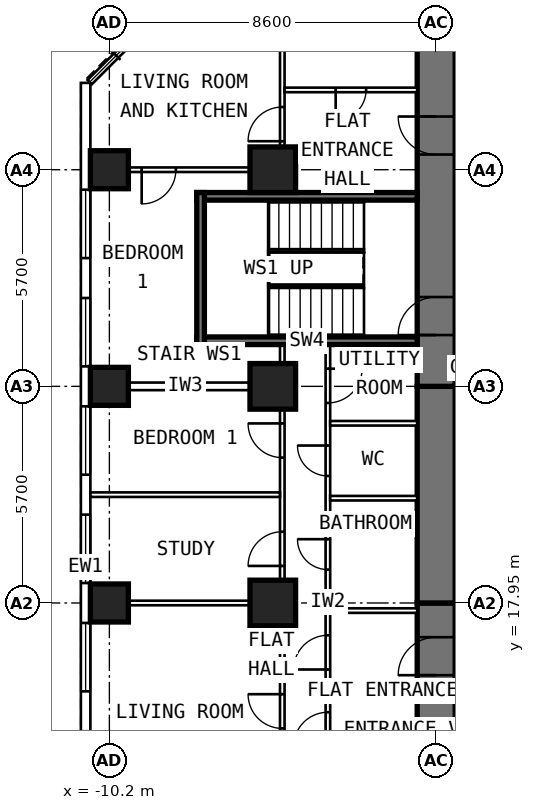
"""IFC4 building model, lengths in metres.
Left out: names, types, materials, properties, quantities, classifications, styles, units other than length and angle.
Written with IfcOpenShell. Run it as: python <this file> out.ifc"""

import sys

from ifc_helpers import new_model, si_unit, direction, frame, frame_2d, origin, origin_2d, place, context, subcontext, project, spatial, rectangle, extrude, element, fill, save


model = new_model("IFC4")
c1 = context("Model", 3, precision=1e-05, world=origin(), true_north=direction((0.0, 1.0)))
c2 = subcontext(c1, "Body", "Model", "MODEL_VIEW")
j1 = project(units=[si_unit("LENGTHUNIT", "METRE"), si_unit("PLANEANGLEUNIT", "RADIAN")], contexts=[c1])
p1 = place(None, origin())
s1 = spatial("IfcSite", under=j1, at=p1, CompositionType="ELEMENT")
p2 = place(p1, origin())
s2 = spatial("IfcBuilding", under=s1, at=p2, CompositionType="ELEMENT")
p3 = place(p2, frame((0.0, 0.0, 61.0)))
s3 = spatial("IfcBuildingStorey", under=s2, at=p3, CompositionType="ELEMENT", Elevation=61.0)
for number, where, z_axis, x_axis in (
    (1, (-10.2, 17.95, 0.0), (0.0, 0.0, 1.0), (0.0, 1.0, 0.0)),
    (2, (-10.2, 23.65, 0.0), (0.0, 0.0, 1.0), (0.0, 1.0, 0.0)),
    (3, (-10.2, 29.35, 0.0), (0.0, 0.0, 1.0), (0.0, 1.0, 0.0)),
):
    element("IfcColumn", number, at=place(p3, frame(where, z_axis=z_axis, x_axis=x_axis)), inside=s3, PredefinedType="COLUMN", context=c2, shape_type="SweptSolid", body=[
        extrude(rectangle(XDim=1.0, YDim=1.0, at=origin_2d()), origin(), (0.0, 0.0, 1.0), 3.6),
    ])
for number, where, z_axis, x_axis in (
    (4, (-5.9, 17.95, 0.0), (0.0, 0.0, 1.0), (0.0, 1.0, 0.0)),
    (5, (-5.9, 23.65, 0.0), (0.0, 0.0, 1.0), (0.0, 1.0, 0.0)),
    (6, (-5.9, 29.35, 0.0), (0.0, 0.0, 1.0), (0.0, 1.0, 0.0)),
):
    element("IfcColumn", number, at=place(p3, frame(where, z_axis=z_axis, x_axis=x_axis)), inside=s3, PredefinedType="COLUMN", context=c2, shape_type="SweptSolid", body=[
        extrude(rectangle(XDim=1.2, YDim=1.2, at=origin_2d()), origin(), (0.0, 0.0, 1.0), 3.6),
    ])
p4 = place(p3, frame((-1.6, 9.6, 0.0), z_axis=(0.0, 0.0, 1.0), x_axis=(0.0, 1.0, 0.0)))
e7 = element("IfcWall", 7, at=p4, inside=s3, PredefinedType="SHEAR", context=c2, shape_type="SweptSolid", body=[
    extrude(rectangle(XDim=8.35, YDim=1.0, at=frame_2d((4.175, 0.0))), origin(), (0.0, 0.0, 1.0), 3.6),
])
p5 = place(p4, frame((6.45, 0.0, 0.0)))
e8 = element("IfcOpeningElement", 8, at=p5, cuts=e7, PredefinedType="OPENING", context=c2, shape_type="SweptSolid", body=[
    extrude(rectangle(XDim=1.0, YDim=2.1, at=frame_2d((0.5, 1.05))), frame((0.0, 0.512, 0.0), z_axis=(0.0, -1.0, 0.0), x_axis=(1.0, 0.0, 0.0)), (0.0, 0.0, 1.0), 1.024),
])
p6 = place(p3, frame((-1.6, 17.95, 0.0), z_axis=(0.0, 0.0, 1.0), x_axis=(0.0, 1.0, 0.0)))
e9 = element("IfcWall", 9, at=p6, inside=s3, PredefinedType="SHEAR", context=c2, shape_type="SweptSolid", body=[
    extrude(rectangle(XDim=5.7, YDim=1.0, at=frame_2d((2.85, 0.0))), origin(), (0.0, 0.0, 1.0), 3.6),
])
p7 = place(p3, frame((-1.6, 23.65, 0.0), z_axis=(0.0, 0.0, 1.0), x_axis=(0.0, 1.0, 0.0)))
e10 = element("IfcWall", 10, at=p7, inside=s3, PredefinedType="SHEAR", context=c2, shape_type="SweptSolid", body=[
    extrude(rectangle(XDim=10.745, YDim=1.0, at=frame_2d((5.373, 0.0))), origin(), (0.0, 0.0, 1.0), 3.6),
])
p8 = place(p7, frame((6.1, 0.0, 0.0)))
e11 = element("IfcOpeningElement", 11, at=p8, cuts=e10, PredefinedType="OPENING", context=c2, shape_type="SweptSolid", body=[
    extrude(rectangle(XDim=1.0, YDim=2.1, at=frame_2d((0.5, 1.05))), frame((0.0, 0.512, 0.0), z_axis=(0.0, -1.0, 0.0), x_axis=(1.0, 0.0, 0.0)), (0.0, 0.0, 1.0), 1.024),
])
p9 = place(p7, frame((1.35, 0.0, 0.0)))
e12 = element("IfcOpeningElement", 12, at=p9, cuts=e10, PredefinedType="OPENING", context=c2, shape_type="SweptSolid", body=[
    extrude(rectangle(XDim=1.0, YDim=2.1, at=frame_2d((0.5, 1.05))), frame((0.0, 0.512, 0.0), z_axis=(0.0, -1.0, 0.0), x_axis=(1.0, 0.0, 0.0)), (0.0, 0.0, 1.0), 1.024),
])
p10 = place(p3, frame((-10.825, 6.148, 0.0), z_axis=(0.0, 0.0, 1.0), x_axis=(0.0, 1.0, 0.0)))
e13 = element("IfcWall", 13, at=p10, inside=s3, PredefinedType="SOLIDWALL", context=c2, shape_type="SweptSolid", body=[
    extrude(rectangle(XDim=25.487, YDim=0.25, at=frame_2d((12.744, 0.0))), origin(), (0.0, 0.0, 1.0), 3.35),
])
p11 = place(p10, frame((0.927, 0.0, 0.8)))
e14 = element("IfcOpeningElement", 14, at=p11, cuts=e13, PredefinedType="OPENING", context=c2, shape_type="SweptSolid", body=[
    extrude(rectangle(XDim=1.8, YDim=1.8, at=frame_2d((0.9, 0.9))), frame((0.0, 0.137, 0.0), z_axis=(0.0, -1.0, 0.0), x_axis=(1.0, 0.0, 0.0)), (0.0, 0.0, 1.0), 0.274),
])
p12 = place(p10, frame((3.777, 0.0, 0.8)))
e15 = element("IfcOpeningElement", 15, at=p12, cuts=e13, PredefinedType="OPENING", context=c2, shape_type="SweptSolid", body=[
    extrude(rectangle(XDim=1.8, YDim=1.8, at=frame_2d((0.9, 0.9))), frame((0.0, 0.137, 0.0), z_axis=(0.0, -1.0, 0.0), x_axis=(1.0, 0.0, 0.0)), (0.0, 0.0, 1.0), 0.274),
])
p13 = place(p10, frame((6.627, 0.0, 0.8)))
e16 = element("IfcOpeningElement", 16, at=p13, cuts=e13, PredefinedType="OPENING", context=c2, shape_type="SweptSolid", body=[
    extrude(rectangle(XDim=1.8, YDim=1.8, at=frame_2d((0.9, 0.9))), frame((0.0, 0.137, 0.0), z_axis=(0.0, -1.0, 0.0), x_axis=(1.0, 0.0, 0.0)), (0.0, 0.0, 1.0), 0.274),
])
p14 = place(p10, frame((9.477, 0.0, 0.8)))
e17 = element("IfcOpeningElement", 17, at=p14, cuts=e13, PredefinedType="OPENING", context=c2, shape_type="SweptSolid", body=[
    extrude(rectangle(XDim=1.8, YDim=1.8, at=frame_2d((0.9, 0.9))), frame((0.0, 0.137, 0.0), z_axis=(0.0, -1.0, 0.0), x_axis=(1.0, 0.0, 0.0)), (0.0, 0.0, 1.0), 0.274),
])
p15 = place(p10, frame((12.327, 0.0, 0.8)))
e18 = element("IfcOpeningElement", 18, at=p15, cuts=e13, PredefinedType="OPENING", context=c2, shape_type="SweptSolid", body=[
    extrude(rectangle(XDim=1.8, YDim=1.8, at=frame_2d((0.9, 0.9))), frame((0.0, 0.137, 0.0), z_axis=(0.0, -1.0, 0.0), x_axis=(1.0, 0.0, 0.0)), (0.0, 0.0, 1.0), 0.274),
])
p16 = place(p10, frame((15.177, 0.0, 0.8)))
e19 = element("IfcOpeningElement", 19, at=p16, cuts=e13, PredefinedType="OPENING", context=c2, shape_type="SweptSolid", body=[
    extrude(rectangle(XDim=1.8, YDim=1.8, at=frame_2d((0.9, 0.9))), frame((0.0, 0.137, 0.0), z_axis=(0.0, -1.0, 0.0), x_axis=(1.0, 0.0, 0.0)), (0.0, 0.0, 1.0), 0.274),
])
p17 = place(p10, frame((18.027, 0.0, 0.8)))
e20 = element("IfcOpeningElement", 20, at=p17, cuts=e13, PredefinedType="OPENING", context=c2, shape_type="SweptSolid", body=[
    extrude(rectangle(XDim=1.8, YDim=1.8, at=frame_2d((0.9, 0.9))), frame((0.0, 0.137, 0.0), z_axis=(0.0, -1.0, 0.0), x_axis=(1.0, 0.0, 0.0)), (0.0, 0.0, 1.0), 0.274),
])
p18 = place(p10, frame((20.877, 0.0, 0.8)))
e21 = element("IfcOpeningElement", 21, at=p18, cuts=e13, PredefinedType="OPENING", context=c2, shape_type="SweptSolid", body=[
    extrude(rectangle(XDim=1.8, YDim=1.8, at=frame_2d((0.9, 0.9))), frame((0.0, 0.137, 0.0), z_axis=(0.0, -1.0, 0.0), x_axis=(1.0, 0.0, 0.0)), (0.0, 0.0, 1.0), 0.274),
])
p19 = place(p3, frame((-4.45, 10.1, 0.0), z_axis=(0.0, 0.0, 1.0), x_axis=(0.0, 1.0, 0.0)))
e22 = element("IfcWall", 22, at=p19, inside=s3, PredefinedType="PARTITIONING", context=c2, shape_type="SweptSolid", body=[
    extrude(rectangle(XDim=14.65, YDim=0.12, at=frame_2d((7.325, 0.0))), origin(), (0.0, 0.0, 1.0), 3.35),
])
p20 = place(p19, frame((0.375, 0.0, 0.0)))
e23 = element("IfcOpeningElement", 23, at=p20, cuts=e22, PredefinedType="OPENING", context=c2, shape_type="SweptSolid", body=[
    extrude(rectangle(XDim=0.9, YDim=2.1, at=frame_2d((0.45, 1.05))), frame((0.0, 0.072, 0.0), z_axis=(0.0, -1.0, 0.0), x_axis=(1.0, 0.0, 0.0)), (0.0, 0.0, 1.0), 0.144),
])
p21 = place(p19, frame((2.275, 0.0, 0.0)))
e24 = element("IfcOpeningElement", 24, at=p21, cuts=e22, PredefinedType="OPENING", context=c2, shape_type="SweptSolid", body=[
    extrude(rectangle(XDim=0.8, YDim=2.1, at=frame_2d((0.4, 1.05))), frame((0.0, 0.072, 0.0), z_axis=(0.0, -1.0, 0.0), x_axis=(1.0, 0.0, 0.0)), (0.0, 0.0, 1.0), 0.144),
])
p22 = place(p19, frame((4.075, 0.0, 0.0)))
e25 = element("IfcOpeningElement", 25, at=p22, cuts=e22, PredefinedType="OPENING", context=c2, shape_type="SweptSolid", body=[
    extrude(rectangle(XDim=0.9, YDim=2.1, at=frame_2d((0.45, 1.05))), frame((0.0, 0.072, 0.0), z_axis=(0.0, -1.0, 0.0), x_axis=(1.0, 0.0, 0.0)), (0.0, 0.0, 1.0), 0.144),
])
p23 = place(p19, frame((6.1, 0.0, 0.0)))
e26 = element("IfcOpeningElement", 26, at=p23, cuts=e22, PredefinedType="OPENING", context=c2, shape_type="SweptSolid", body=[
    extrude(rectangle(XDim=0.9, YDim=2.1, at=frame_2d((0.45, 1.05))), frame((0.0, 0.072, 0.0), z_axis=(0.0, -1.0, 0.0), x_axis=(1.0, 0.0, 0.0)), (0.0, 0.0, 1.0), 0.144),
])
p24 = place(p19, frame((8.729, 0.0, 0.0)))
e27 = element("IfcOpeningElement", 27, at=p24, cuts=e22, PredefinedType="OPENING", context=c2, shape_type="SweptSolid", body=[
    extrude(rectangle(XDim=0.8, YDim=2.1, at=frame_2d((0.4, 1.05))), frame((0.0, 0.072, 0.0), z_axis=(0.0, -1.0, 0.0), x_axis=(1.0, 0.0, 0.0)), (0.0, 0.0, 1.0), 0.144),
])
p25 = place(p19, frame((11.193, 0.0, 0.0)))
e28 = element("IfcOpeningElement", 28, at=p25, cuts=e22, PredefinedType="OPENING", context=c2, shape_type="SweptSolid", body=[
    extrude(rectangle(XDim=0.8, YDim=2.1, at=frame_2d((0.4, 1.05))), frame((0.0, 0.072, 0.0), z_axis=(0.0, -1.0, 0.0), x_axis=(1.0, 0.0, 0.0)), (0.0, 0.0, 1.0), 0.144),
])
p26 = place(p19, frame((13.114, 0.0, 0.0)))
e29 = element("IfcOpeningElement", 29, at=p26, cuts=e22, PredefinedType="OPENING", context=c2, shape_type="SweptSolid", body=[
    extrude(rectangle(XDim=0.9, YDim=2.1, at=frame_2d((0.45, 1.05))), frame((0.0, 0.072, 0.0), z_axis=(0.0, -1.0, 0.0), x_axis=(1.0, 0.0, 0.0)), (0.0, 0.0, 1.0), 0.144),
])
p27 = place(p3, frame((-5.65, 9.6, 0.0), z_axis=(0.0, 0.0, 1.0), x_axis=(0.0, 1.0, 0.0)))
e30 = element("IfcWall", 30, at=p27, inside=s3, PredefinedType="PARTITIONING", context=c2, shape_type="SweptSolid", body=[
    extrude(rectangle(XDim=15.15, YDim=0.12, at=frame_2d((7.575, 0.0))), origin(), (0.0, 0.0, 1.0), 3.35),
])
p28 = place(p27, frame((5.05, 0.0, 0.0)))
e31 = element("IfcOpeningElement", 31, at=p28, cuts=e30, PredefinedType="OPENING", context=c2, shape_type="SweptSolid", body=[
    extrude(rectangle(XDim=0.9, YDim=2.1, at=frame_2d((0.45, 1.05))), frame((0.0, 0.072, 0.0), z_axis=(0.0, -1.0, 0.0), x_axis=(1.0, 0.0, 0.0)), (0.0, 0.0, 1.0), 0.144),
])
p29 = place(p27, frame((9.325, 0.0, 0.0)))
e32 = element("IfcOpeningElement", 32, at=p29, cuts=e30, PredefinedType="OPENING", context=c2, shape_type="SweptSolid", body=[
    extrude(rectangle(XDim=0.9, YDim=2.1, at=frame_2d((0.45, 1.05))), frame((0.0, 0.072, 0.0), z_axis=(0.0, -1.0, 0.0), x_axis=(1.0, 0.0, 0.0)), (0.0, 0.0, 1.0), 0.144),
])
p30 = place(p27, frame((12.175, 0.0, 0.0)))
e33 = element("IfcOpeningElement", 33, at=p30, cuts=e30, PredefinedType="OPENING", context=c2, shape_type="SweptSolid", body=[
    extrude(rectangle(XDim=0.9, YDim=2.1, at=frame_2d((0.45, 1.05))), frame((0.0, 0.072, 0.0), z_axis=(0.0, -1.0, 0.0), x_axis=(1.0, 0.0, 0.0)), (0.0, 0.0, 1.0), 0.144),
])
p31 = place(p3, frame((-5.71, 17.95, 0.0), z_axis=(0.0, 0.0, 1.0), x_axis=(-1.0, 0.0, 0.0)))
e34 = element("IfcWall", 34, at=p31, inside=s3, PredefinedType="PARTITIONING", context=c2, shape_type="SweptSolid", body=[
    extrude(rectangle(XDim=4.99, YDim=0.12, at=frame_2d((2.495, 0.0))), origin(), (0.0, 0.0, 1.0), 2.45),
])
p32 = place(p3, frame((-5.71, 20.8, 0.0), z_axis=(0.0, 0.0, 1.0), x_axis=(-1.0, 0.0, 0.0)))
e35 = element("IfcWall", 35, at=p32, inside=s3, PredefinedType="PARTITIONING", context=c2, shape_type="SweptSolid", body=[
    extrude(rectangle(XDim=4.99, YDim=0.12, at=frame_2d((2.495, 0.0))), origin(), (0.0, 0.0, 1.0), 3.35),
])
p33 = place(p3, frame((-2.1, 15.55, 0.0), z_axis=(0.0, 0.0, 1.0), x_axis=(-1.0, 0.0, 0.0)))
e36 = element("IfcWall", 36, at=p33, inside=s3, PredefinedType="PARTITIONING", context=c2, shape_type="SweptSolid", body=[
    extrude(rectangle(XDim=2.29, YDim=0.12, at=frame_2d((1.145, 0.0))), origin(), (0.0, 0.0, 1.0), 3.35),
])
p34 = place(p3, frame((-2.1, 17.75, 0.0), z_axis=(0.0, 0.0, 1.0), x_axis=(-1.0, 0.0, 0.0)))
e37 = element("IfcWall", 37, at=p34, inside=s3, PredefinedType="PARTITIONING", context=c2, shape_type="SweptSolid", body=[
    extrude(rectangle(XDim=2.29, YDim=0.12, at=frame_2d((1.145, 0.0))), origin(), (0.0, 0.0, 1.0), 2.45),
])
for number, where, z_axis, x_axis in (
    (38, (-2.1, 20.707, 0.0), (0.0, 0.0, 1.0), (-1.0, 0.0, 0.0)),
    (39, (-2.1, 22.678, 0.0), (0.0, 0.0, 1.0), (-1.0, 0.0, 0.0)),
):
    element("IfcWall", number, at=place(p3, frame(where, z_axis=z_axis, x_axis=x_axis)), inside=s3, PredefinedType="PARTITIONING", context=c2, shape_type="SweptSolid", body=[
        extrude(rectangle(XDim=2.29, YDim=0.12, at=frame_2d((1.145, 0.0))), origin(), (0.0, 0.0, 1.0), 3.35),
    ])
p35 = place(p3, frame((-5.71, 23.65, 0.0), z_axis=(0.0, 0.0, 1.0), x_axis=(-1.0, 0.0, 0.0)))
e40 = element("IfcWall", 40, at=p35, inside=s3, PredefinedType="PARTITIONING", context=c2, shape_type="SweptSolid", body=[
    extrude(rectangle(XDim=4.99, YDim=0.2, at=frame_2d((2.495, 0.0))), origin(), (0.0, 0.0, 1.0), 2.45),
])
p36 = place(p3, frame((-5.71, 29.35, 0.0), z_axis=(0.0, 0.0, 1.0), x_axis=(-1.0, 0.0, 0.0)))
e41 = element("IfcWall", 41, at=p36, inside=s3, PredefinedType="PARTITIONING", context=c2, shape_type="SweptSolid", body=[
    extrude(rectangle(XDim=4.99, YDim=0.12, at=frame_2d((2.495, 0.0))), origin(), (0.0, 0.0, 1.0), 2.45),
])
p37 = place(p36, frame((2.74, 0.0, 0.0)))
e42 = element("IfcOpeningElement", 42, at=p37, cuts=e41, PredefinedType="OPENING", context=c2, shape_type="SweptSolid", body=[
    extrude(rectangle(XDim=0.9, YDim=2.1, at=frame_2d((0.45, 1.05))), frame((0.0, 0.072, 0.0), z_axis=(0.0, -1.0, 0.0), x_axis=(1.0, 0.0, 0.0)), (0.0, 0.0, 1.0), 0.144),
])
p38 = place(p3, frame((-5.65, 28.95, 0.0), z_axis=(0.0, 0.0, 1.0), x_axis=(0.0, 1.0, 0.0)))
e43 = element("IfcWall", 43, at=p38, inside=s3, PredefinedType="PARTITIONING", context=c2, shape_type="SweptSolid", body=[
    extrude(rectangle(XDim=5.445, YDim=0.12, at=frame_2d((2.723, 0.0))), origin(), (0.0, 0.0, 1.0), 3.35),
])
p39 = place(p38, frame((1.15, 0.0, 0.0)))
e44 = element("IfcOpeningElement", 44, at=p39, cuts=e43, PredefinedType="OPENING", context=c2, shape_type="SweptSolid", body=[
    extrude(rectangle(XDim=0.9, YDim=2.1, at=frame_2d((0.45, 1.05))), frame((0.0, 0.072, 0.0), z_axis=(0.0, -1.0, 0.0), x_axis=(1.0, 0.0, 0.0)), (0.0, 0.0, 1.0), 0.144),
])
p40 = place(p3, frame((-2.1, 31.45, 0.0), z_axis=(0.0, 0.0, 1.0), x_axis=(-1.0, 0.0, 0.0)))
e45 = element("IfcWall", 45, at=p40, inside=s3, PredefinedType="PARTITIONING", context=c2, shape_type="SweptSolid", body=[
    extrude(rectangle(XDim=3.49, YDim=0.12, at=frame_2d((1.745, 0.0))), origin(), (0.0, 0.0, 1.0), 3.35),
])
p41 = place(p40, frame((1.345, 0.0, 0.0)))
e46 = element("IfcOpeningElement", 46, at=p41, cuts=e45, PredefinedType="OPENING", context=c2, shape_type="SweptSolid", body=[
    extrude(rectangle(XDim=0.8, YDim=2.1, at=frame_2d((0.4, 1.05))), frame((0.0, 0.072, 0.0), z_axis=(0.0, -1.0, 0.0), x_axis=(1.0, 0.0, 0.0)), (0.0, 0.0, 1.0), 0.144),
])
for number, where, z_axis, x_axis in (
    (47, (-2.1, 24.85, 0.0), (0.0, 0.0, 1.0), (-1.0, 0.0, 0.0)),
    (48, (-2.1, 28.65, 0.0), (0.0, 0.0, 1.0), (-1.0, 0.0, 0.0)),
):
    element("IfcWall", number, at=place(p3, frame(where, z_axis=z_axis, x_axis=x_axis)), inside=s3, PredefinedType="SHEAR", context=c2, shape_type="SweptSolid", body=[
        extrude(rectangle(XDim=5.8, YDim=0.2, at=frame_2d((2.9, 0.0))), origin(), (0.0, 0.0, 1.0), 3.33),
    ])
p42 = place(p3, frame((-7.8, 24.75, 0.0), z_axis=(0.0, 0.0, 1.0), x_axis=(0.0, 1.0, 0.0)))
e49 = element("IfcWall", 49, at=p42, inside=s3, PredefinedType="SHEAR", context=c2, shape_type="SweptSolid", body=[
    extrude(rectangle(XDim=4.0, YDim=0.2, at=frame_2d((2.0, 0.0))), origin(), (0.0, 0.0, 1.0), 3.33),
])
p43 = place(p14, origin())
e50 = element("IfcWindow", 50, at=p43, inside=s3, PartitioningType="SINGLE_PANEL", PredefinedType="WINDOW", context=c2, shape_type="SweptSolid", body=[
    extrude(rectangle(XDim=1.8, YDim=1.8, at=frame_2d((0.9, 0.9))), frame((0.0, 0.03, 0.0), z_axis=(0.0, -1.0, 0.0), x_axis=(1.0, 0.0, 0.0)), (0.0, 0.0, 1.0), 0.06),
])
fill(e17, e50)
p44 = place(p15, origin())
e51 = element("IfcWindow", 51, at=p44, inside=s3, PartitioningType="SINGLE_PANEL", PredefinedType="WINDOW", context=c2, shape_type="SweptSolid", body=[
    extrude(rectangle(XDim=1.8, YDim=1.8, at=frame_2d((0.9, 0.9))), frame((0.0, 0.03, 0.0), z_axis=(0.0, -1.0, 0.0), x_axis=(1.0, 0.0, 0.0)), (0.0, 0.0, 1.0), 0.06),
])
fill(e18, e51)
p45 = place(p16, origin())
e52 = element("IfcWindow", 52, at=p45, inside=s3, PartitioningType="SINGLE_PANEL", PredefinedType="WINDOW", context=c2, shape_type="SweptSolid", body=[
    extrude(rectangle(XDim=1.8, YDim=1.8, at=frame_2d((0.9, 0.9))), frame((0.0, 0.03, 0.0), z_axis=(0.0, -1.0, 0.0), x_axis=(1.0, 0.0, 0.0)), (0.0, 0.0, 1.0), 0.06),
])
fill(e19, e52)
p46 = place(p17, origin())
e53 = element("IfcWindow", 53, at=p46, inside=s3, PartitioningType="SINGLE_PANEL", PredefinedType="WINDOW", context=c2, shape_type="SweptSolid", body=[
    extrude(rectangle(XDim=1.8, YDim=1.8, at=frame_2d((0.9, 0.9))), frame((0.0, 0.03, 0.0), z_axis=(0.0, -1.0, 0.0), x_axis=(1.0, 0.0, 0.0)), (0.0, 0.0, 1.0), 0.06),
])
fill(e20, e53)
p47 = place(p18, origin())
e54 = element("IfcWindow", 54, at=p47, inside=s3, PartitioningType="SINGLE_PANEL", PredefinedType="WINDOW", context=c2, shape_type="SweptSolid", body=[
    extrude(rectangle(XDim=1.8, YDim=1.8, at=frame_2d((0.9, 0.9))), frame((0.0, 0.03, 0.0), z_axis=(0.0, -1.0, 0.0), x_axis=(1.0, 0.0, 0.0)), (0.0, 0.0, 1.0), 0.06),
])
fill(e21, e54)
p48 = place(p5, origin())
e55 = element("IfcDoor", 55, at=p48, inside=s3, OperationType="SINGLE_SWING_LEFT", PredefinedType="DOOR", context=c2, shape_type="SweptSolid", body=[
    extrude(rectangle(XDim=1.0, YDim=2.1, at=frame_2d((0.5, 1.05))), frame((0.0, 0.25, 0.0), z_axis=(0.0, -1.0, 0.0), x_axis=(1.0, 0.0, 0.0)), (0.0, 0.0, 1.0), 0.5),
])
fill(e8, e55)
p49 = place(p28, origin())
e56 = element("IfcDoor", 56, at=p49, inside=s3, OperationType="SINGLE_SWING_RIGHT", PredefinedType="DOOR", context=c2, shape_type="SweptSolid", body=[
    extrude(rectangle(XDim=0.9, YDim=2.1, at=frame_2d((0.45, 1.05))), frame((0.0, 0.025, 0.0), z_axis=(0.0, -1.0, 0.0), x_axis=(1.0, 0.0, 0.0)), (0.0, 0.0, 1.0), 0.05),
])
fill(e31, e56)
p50 = place(p29, origin())
e57 = element("IfcDoor", 57, at=p50, inside=s3, OperationType="SINGLE_SWING_LEFT", PredefinedType="DOOR", context=c2, shape_type="SweptSolid", body=[
    extrude(rectangle(XDim=0.9, YDim=2.1, at=frame_2d((0.45, 1.05))), frame((0.0, 0.025, 0.0), z_axis=(0.0, -1.0, 0.0), x_axis=(1.0, 0.0, 0.0)), (0.0, 0.0, 1.0), 0.05),
])
fill(e32, e57)
p51 = place(p30, origin())
e58 = element("IfcDoor", 58, at=p51, inside=s3, OperationType="SINGLE_SWING_RIGHT", PredefinedType="DOOR", context=c2, shape_type="SweptSolid", body=[
    extrude(rectangle(XDim=0.9, YDim=2.1, at=frame_2d((0.45, 1.05))), frame((0.0, 0.025, 0.0), z_axis=(0.0, -1.0, 0.0), x_axis=(1.0, 0.0, 0.0)), (0.0, 0.0, 1.0), 0.05),
])
fill(e33, e58)
p52 = place(p22, origin())
e59 = element("IfcDoor", 59, at=p52, inside=s3, OperationType="SINGLE_SWING_LEFT", PredefinedType="DOOR", context=c2, shape_type="SweptSolid", body=[
    extrude(rectangle(XDim=0.9, YDim=2.1, at=frame_2d((0.45, 1.05))), frame((0.0, 0.025, 0.0), z_axis=(0.0, -1.0, 0.0), x_axis=(1.0, 0.0, 0.0)), (0.0, 0.0, 1.0), 0.05),
])
fill(e25, e59)
p53 = place(p23, origin())
e60 = element("IfcDoor", 60, at=p53, inside=s3, OperationType="SINGLE_SWING_LEFT", PredefinedType="DOOR", context=c2, shape_type="SweptSolid", body=[
    extrude(rectangle(XDim=0.9, YDim=2.1, at=frame_2d((0.45, 1.05))), frame((0.0, 0.025, 0.0), z_axis=(0.0, -1.0, 0.0), x_axis=(1.0, 0.0, 0.0)), (0.0, 0.0, 1.0), 0.05),
])
fill(e26, e60)
p54 = place(p24, origin())
e61 = element("IfcDoor", 61, at=p54, inside=s3, OperationType="SINGLE_SWING_RIGHT", PredefinedType="DOOR", context=c2, shape_type="SweptSolid", body=[
    extrude(rectangle(XDim=0.8, YDim=2.1, at=frame_2d((0.4, 1.05))), frame((0.0, 0.025, 0.0), z_axis=(0.0, -1.0, 0.0), x_axis=(1.0, 0.0, 0.0)), (0.0, 0.0, 1.0), 0.05),
])
fill(e27, e61)
p55 = place(p25, origin())
e62 = element("IfcDoor", 62, at=p55, inside=s3, OperationType="SINGLE_SWING_RIGHT", PredefinedType="DOOR", context=c2, shape_type="SweptSolid", body=[
    extrude(rectangle(XDim=0.8, YDim=2.1, at=frame_2d((0.4, 1.05))), frame((0.0, 0.025, 0.0), z_axis=(0.0, -1.0, 0.0), x_axis=(1.0, 0.0, 0.0)), (0.0, 0.0, 1.0), 0.05),
])
fill(e28, e62)
p56 = place(p26, frame((0.9, 0.0, 0.0), z_axis=(0.0, 0.0, 1.0), x_axis=(-1.0, 0.0, 0.0)))
e63 = element("IfcDoor", 63, at=p56, inside=s3, OperationType="SINGLE_SWING_LEFT", PredefinedType="DOOR", context=c2, shape_type="SweptSolid", body=[
    extrude(rectangle(XDim=0.9, YDim=2.1, at=frame_2d((0.45, 1.05))), frame((0.0, 0.025, 0.0), z_axis=(0.0, -1.0, 0.0), x_axis=(1.0, 0.0, 0.0)), (0.0, 0.0, 1.0), 0.05),
])
fill(e29, e63)
p57 = place(p37, origin())
e64 = element("IfcDoor", 64, at=p57, inside=s3, OperationType="SINGLE_SWING_RIGHT", PredefinedType="DOOR", context=c2, shape_type="SweptSolid", body=[
    extrude(rectangle(XDim=0.9, YDim=2.1, at=frame_2d((0.45, 1.05))), frame((0.0, 0.025, 0.0), z_axis=(0.0, -1.0, 0.0), x_axis=(1.0, 0.0, 0.0)), (0.0, 0.0, 1.0), 0.05),
])
fill(e42, e64)
p58 = place(p39, origin())
e65 = element("IfcDoor", 65, at=p58, inside=s3, OperationType="SINGLE_SWING_LEFT", PredefinedType="DOOR", context=c2, shape_type="SweptSolid", body=[
    extrude(rectangle(XDim=0.9, YDim=2.1, at=frame_2d((0.45, 1.05))), frame((0.0, 0.025, 0.0), z_axis=(0.0, -1.0, 0.0), x_axis=(1.0, 0.0, 0.0)), (0.0, 0.0, 1.0), 0.05),
])
fill(e44, e65)
p59 = place(p41, origin())
e66 = element("IfcDoor", 66, at=p59, inside=s3, OperationType="SINGLE_SWING_RIGHT", PredefinedType="DOOR", context=c2, shape_type="SweptSolid", body=[
    extrude(rectangle(XDim=0.8, YDim=2.1, at=frame_2d((0.4, 1.05))), frame((0.0, 0.025, 0.0), z_axis=(0.0, -1.0, 0.0), x_axis=(1.0, 0.0, 0.0)), (0.0, 0.0, 1.0), 0.05),
])
fill(e46, e66)
p60 = place(p8, origin())
e67 = element("IfcDoor", 67, at=p60, inside=s3, OperationType="SINGLE_SWING_RIGHT", PredefinedType="DOOR", context=c2, shape_type="SweptSolid", body=[
    extrude(rectangle(XDim=1.0, YDim=2.1, at=frame_2d((0.5, 1.05))), frame((0.0, 0.25, 0.0), z_axis=(0.0, -1.0, 0.0), x_axis=(1.0, 0.0, 0.0)), (0.0, 0.0, 1.0), 0.5),
])
fill(e11, e67)
p61 = place(p9, origin())
e68 = element("IfcDoor", 68, at=p61, inside=s3, OperationType="SINGLE_SWING_LEFT", PredefinedType="DOOR", context=c2, shape_type="SweptSolid", body=[
    extrude(rectangle(XDim=1.0, YDim=2.1, at=frame_2d((0.5, 1.05))), frame((0.0, 0.25, 0.0), z_axis=(0.0, -1.0, 0.0), x_axis=(1.0, 0.0, 0.0)), (0.0, 0.0, 1.0), 0.5),
])
fill(e12, e68)
save(model, sys.argv[1])
